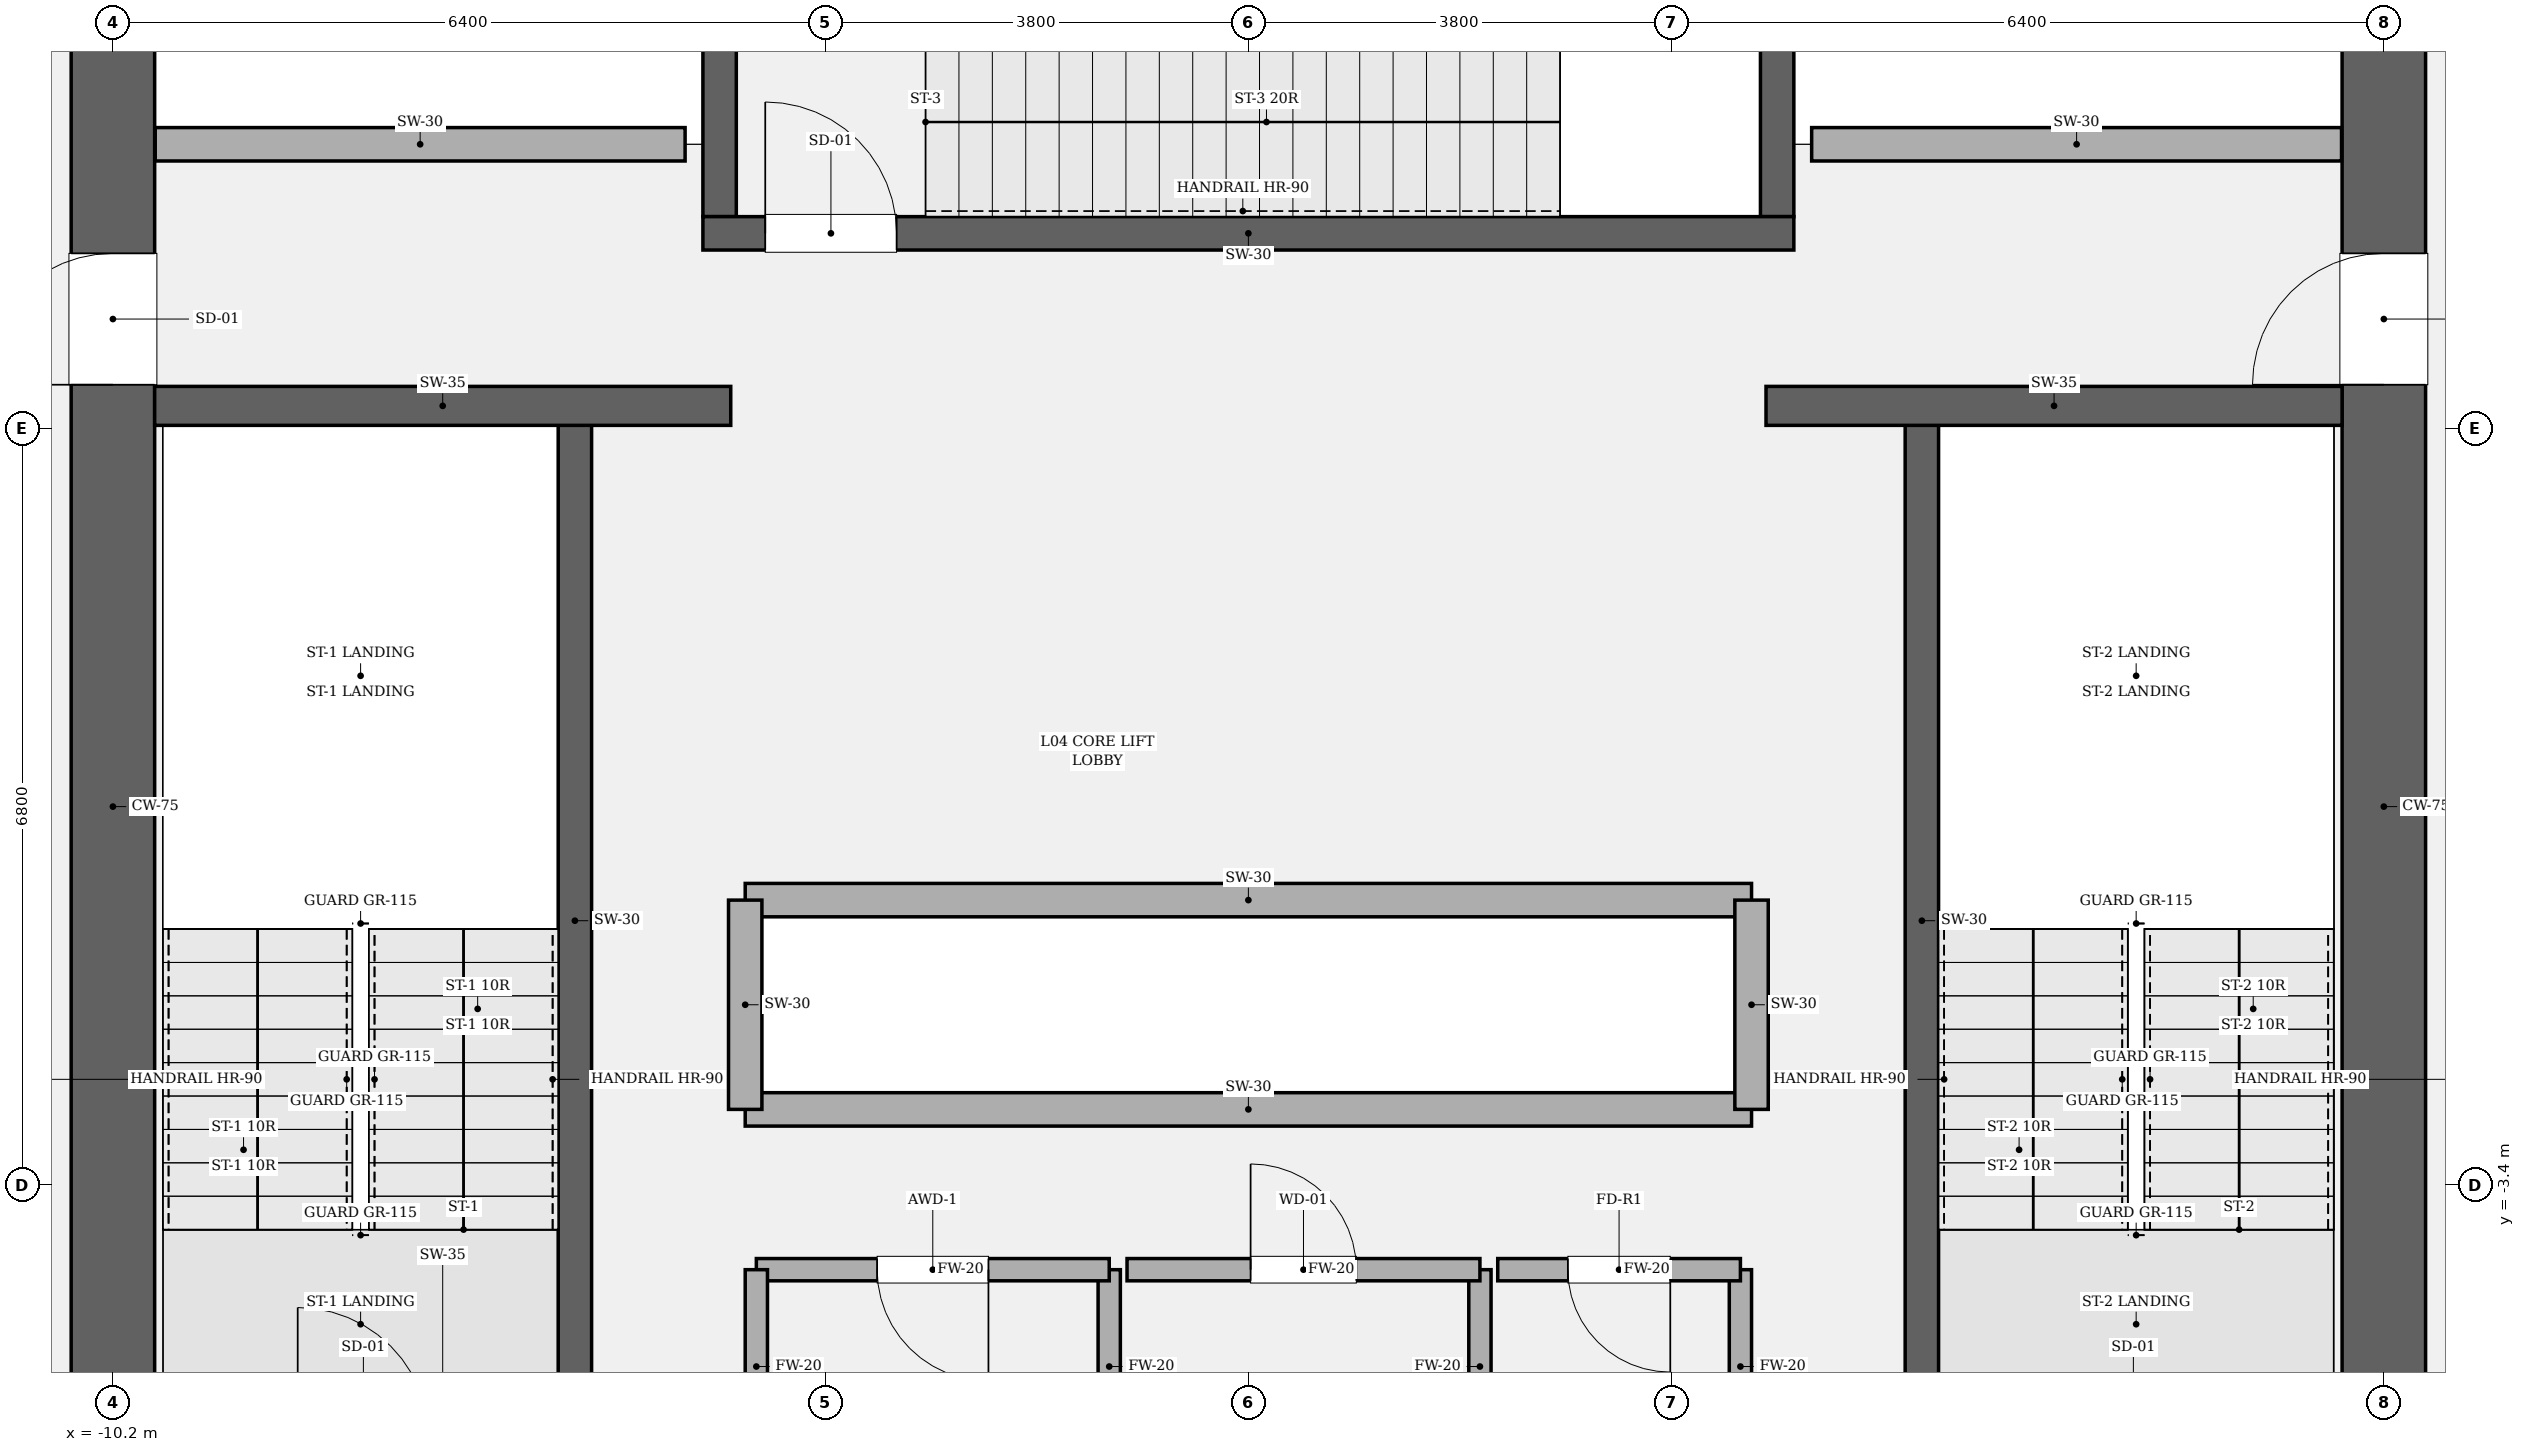
"""IFC4 building model, lengths in metres.
Left out: names, types, materials, properties, quantities, classifications, styles, units other than length and angle.
Written with IfcOpenShell. Run it as: python <this file> out.ifc"""

import sys

from ifc_helpers import new_model, si_unit, direction, frame, frame_2d, origin, place, context, subcontext, project, spatial, rectangle, extrude, element, fill, save


model = new_model("IFC4")
c1 = context("Model", 3, precision=1e-05, world=origin(), true_north=direction((0.0, 1.0)))
c2 = subcontext(c1, "Body", "Model", "MODEL_VIEW")
j1 = project(units=[si_unit("LENGTHUNIT", "METRE"), si_unit("PLANEANGLEUNIT", "RADIAN")], contexts=[c1])
p1 = place(None, origin())
s1 = spatial("IfcSite", under=j1, at=p1, CompositionType="ELEMENT")
p2 = place(p1, origin())
s2 = spatial("IfcBuilding", under=s1, at=p2, CompositionType="ELEMENT")
p3 = place(p2, frame((0.0, 0.0, 22.2)))
s3 = spatial("IfcBuildingStorey", under=s2, at=p3, CompositionType="ELEMENT", Elevation=22.2)
p4 = place(p3, frame((-10.2, -8.825, 0.0), z_axis=(0.0, 0.0, 1.0), x_axis=(0.0, 1.0, 0.0)))
e1 = element("IfcWall", 1, at=p4, inside=s3, PredefinedType="SHEAR", context=c2, shape_type="SweptSolid", body=[
    extrude(rectangle(XDim=17.65, YDim=0.75, at=frame_2d((8.825, 0.0))), origin(), (0.0, 0.0, 1.0), 6.0),
])
p5 = place(p4, frame((12.615, 0.0, 0.0)))
e2 = element("IfcOpeningElement", 2, at=p5, cuts=e1, PredefinedType="OPENING", context=c2, shape_type="SweptSolid", body=[
    extrude(rectangle(XDim=1.18, YDim=2.2, at=frame_2d((0.59, 1.1))), frame((0.0, 0.385, 0.0), z_axis=(0.0, -1.0, 0.0), x_axis=(1.0, 0.0, 0.0)), (0.0, 0.0, 1.0), 0.77),
])
p6 = place(p3, frame((10.2, 8.825, 0.0), z_axis=(0.0, 0.0, 1.0), x_axis=(0.0, -1.0, 0.0)))
e3 = element("IfcWall", 3, at=p6, inside=s3, PredefinedType="SHEAR", context=c2, shape_type="SweptSolid", body=[
    extrude(rectangle(XDim=17.65, YDim=0.75, at=frame_2d((8.825, 0.0))), origin(), (0.0, 0.0, 1.0), 6.0),
])
p7 = place(p6, frame((3.855, 0.0, 0.0)))
e4 = element("IfcOpeningElement", 4, at=p7, cuts=e3, PredefinedType="OPENING", context=c2, shape_type="SweptSolid", body=[
    extrude(rectangle(XDim=1.18, YDim=2.2, at=frame_2d((0.59, 1.1))), frame((0.0, 0.385, 0.0), z_axis=(0.0, -1.0, 0.0), x_axis=(1.0, 0.0, 0.0)), (0.0, 0.0, 1.0), 0.77),
])
for number, where, z_axis, x_axis in (
    (5, (-6.05, -5.5, 0.0), (0.0, 0.0, 1.0), (0.0, 1.0, 0.0)),
    (6, (6.05, 3.45, 0.0), (0.0, 0.0, 1.0), (0.0, -1.0, 0.0)),
):
    element("IfcWall", number, at=place(p3, frame(where, z_axis=z_axis, x_axis=x_axis)), inside=s3, PredefinedType="SOLIDWALL", context=c2, shape_type="SweptSolid", body=[
        extrude(rectangle(XDim=8.95, YDim=0.3, at=frame_2d((4.475, 0.0))), origin(), (0.0, 0.0, 1.0), 6.0),
    ])
for number, where, z_axis, x_axis in (
    (7, (-4.75, 5.3, 0.0), (0.0, 0.0, 1.0), (0.0, 1.0, 0.0)),
    (8, (4.75, 8.825, 0.0), (0.0, 0.0, 1.0), (0.0, -1.0, 0.0)),
):
    element("IfcWall", number, at=place(p3, frame(where, z_axis=z_axis, x_axis=x_axis)), inside=s3, PredefinedType="SOLIDWALL", context=c2, shape_type="SweptSolid", body=[
        extrude(rectangle(XDim=3.525, YDim=0.3, at=frame_2d((1.762, 0.0))), origin(), (0.0, 0.0, 1.0), 6.0),
    ])
p8 = place(p3, frame((-4.9, 5.15, 0.0), z_axis=(0.0, 0.0, 1.0), x_axis=(1.0, 0.0, 0.0)))
e9 = element("IfcWall", 9, at=p8, inside=s3, PredefinedType="SOLIDWALL", context=c2, shape_type="SweptSolid", body=[
    extrude(rectangle(XDim=9.8, YDim=0.3, at=frame_2d((4.9, 0.0))), origin(), (0.0, 0.0, 1.0), 6.0),
])
p9 = place(p8, frame((0.56, 0.0, 0.0)))
e10 = element("IfcOpeningElement", 10, at=p9, cuts=e9, PredefinedType="OPENING", context=c2, shape_type="SweptSolid", body=[
    extrude(rectangle(XDim=1.18, YDim=2.2, at=frame_2d((0.59, 1.1))), frame((0.0, 0.16, 0.0), z_axis=(0.0, -1.0, 0.0), x_axis=(1.0, 0.0, 0.0)), (0.0, 0.0, 1.0), 0.32),
])
for number, where, z_axis, x_axis in (
    (11, (-9.825, 3.6, 0.0), (0.0, 0.0, 1.0), (1.0, 0.0, 0.0)),
    (12, (4.65, 3.6, 0.0), (0.0, 0.0, 1.0), (1.0, 0.0, 0.0)),
):
    element("IfcWall", number, at=place(p3, frame(where, z_axis=z_axis, x_axis=x_axis)), inside=s3, PredefinedType="SOLIDWALL", context=c2, shape_type="SweptSolid", body=[
        extrude(rectangle(XDim=5.175, YDim=0.35, at=frame_2d((2.587, 0.0))), origin(), (0.0, 0.0, 1.0), 6.0),
    ])
for number, where, z_axis, x_axis in (
    (13, (-4.52, -0.84, 0.0), (0.0, 0.0, 1.0), (1.0, 0.0, 0.0)),
    (14, (-4.52, -2.72, 0.0), (0.0, 0.0, 1.0), (1.0, 0.0, 0.0)),
):
    element("IfcWall", number, at=place(p3, frame(where, z_axis=z_axis, x_axis=x_axis)), inside=s3, PredefinedType="SOLIDWALL", context=c2, shape_type="SweptSolid", body=[
        extrude(rectangle(XDim=9.04, YDim=0.3, at=frame_2d((4.52, 0.0))), origin(), (0.0, 0.0, 1.0), 5.72),
    ])
for number, where, z_axis, x_axis in (
    (15, (-4.52, -2.72, 0.0), (0.0, 0.0, 1.0), (0.0, 1.0, 0.0)),
    (16, (4.52, -2.72, 0.0), (0.0, 0.0, 1.0), (0.0, 1.0, 0.0)),
):
    element("IfcWall", number, at=place(p3, frame(where, z_axis=z_axis, x_axis=x_axis)), inside=s3, PredefinedType="SOLIDWALL", context=c2, shape_type="SweptSolid", body=[
        extrude(rectangle(XDim=1.88, YDim=0.3, at=frame_2d((0.94, 0.0))), origin(), (0.0, 0.0, 1.0), 5.72),
    ])
for number, where, z_axis, x_axis in (
    (17, (-9.82, 5.95, 0.0), (0.0, 0.0, 1.0), (1.0, 0.0, 0.0)),
    (18, (5.06, 5.95, 0.0), (0.0, 0.0, 1.0), (1.0, 0.0, 0.0)),
):
    element("IfcWall", number, at=place(p3, frame(where, z_axis=z_axis, x_axis=x_axis)), inside=s3, PredefinedType="SOLIDWALL", context=c2, shape_type="SweptSolid", body=[
        extrude(rectangle(XDim=4.76, YDim=0.3, at=frame_2d((2.38, 0.0))), origin(), (0.0, 0.0, 1.0), 5.72),
    ])
p10 = place(p3, frame((-1.25, -5.9, 0.0), z_axis=(0.0, 0.0, 1.0), x_axis=(0.0, 1.0, 0.0)))
e19 = element("IfcWall", 19, at=p10, inside=s3, PredefinedType="SOLIDWALL", context=c2, shape_type="SweptSolid", body=[
    extrude(rectangle(XDim=1.74, YDim=0.2, at=frame_2d((0.87, 0.0))), origin(), (0.0, 0.0, 1.0), 5.72),
])
p11 = place(p3, frame((-1.25, -4.16, 0.0), z_axis=(0.0, 0.0, 1.0), x_axis=(-1.0, 0.0, 0.0)))
e20 = element("IfcWall", 20, at=p11, inside=s3, PredefinedType="SOLIDWALL", context=c2, shape_type="SweptSolid", body=[
    extrude(rectangle(XDim=3.17, YDim=0.2, at=frame_2d((1.585, 0.0))), origin(), (0.0, 0.0, 1.0), 5.72),
])
p12 = place(p11, frame((1.085, 0.0, 0.0)))
e21 = element("IfcOpeningElement", 21, at=p12, cuts=e20, PredefinedType="OPENING", context=c2, shape_type="SweptSolid", body=[
    extrude(rectangle(XDim=1.0, YDim=2.15, at=frame_2d((0.5, 1.075))), frame((0.0, 0.11, 0.0), z_axis=(0.0, -1.0, 0.0), x_axis=(1.0, 0.0, 0.0)), (0.0, 0.0, 1.0), 0.22),
])
for number, where, z_axis, x_axis in (
    (22, (-4.42, -4.16, 0.0), (0.0, 0.0, 1.0), (0.0, -1.0, 0.0)),
    (23, (2.08, -5.9, 0.0), (0.0, 0.0, 1.0), (0.0, 1.0, 0.0)),
):
    element("IfcWall", number, at=place(p3, frame(where, z_axis=z_axis, x_axis=x_axis)), inside=s3, PredefinedType="SOLIDWALL", context=c2, shape_type="SweptSolid", body=[
        extrude(rectangle(XDim=1.74, YDim=0.2, at=frame_2d((0.87, 0.0))), origin(), (0.0, 0.0, 1.0), 5.72),
    ])
p13 = place(p3, frame((2.08, -4.16, 0.0), z_axis=(0.0, 0.0, 1.0), x_axis=(-1.0, 0.0, 0.0)))
e24 = element("IfcWall", 24, at=p13, inside=s3, PredefinedType="SOLIDWALL", context=c2, shape_type="SweptSolid", body=[
    extrude(rectangle(XDim=3.17, YDim=0.2, at=frame_2d((1.585, 0.0))), origin(), (0.0, 0.0, 1.0), 5.72),
])
p14 = place(p13, frame((1.11, 0.0, 0.0)))
e25 = element("IfcOpeningElement", 25, at=p14, cuts=e24, PredefinedType="OPENING", context=c2, shape_type="SweptSolid", body=[
    extrude(rectangle(XDim=0.95, YDim=2.15, at=frame_2d((0.475, 1.075))), frame((0.0, 0.11, 0.0), z_axis=(0.0, -1.0, 0.0), x_axis=(1.0, 0.0, 0.0)), (0.0, 0.0, 1.0), 0.22),
])
p15 = place(p3, frame((4.42, -5.9, 0.0), z_axis=(0.0, 0.0, 1.0), x_axis=(0.0, 1.0, 0.0)))
e26 = element("IfcWall", 26, at=p15, inside=s3, PredefinedType="SOLIDWALL", context=c2, shape_type="SweptSolid", body=[
    extrude(rectangle(XDim=1.74, YDim=0.2, at=frame_2d((0.87, 0.0))), origin(), (0.0, 0.0, 1.0), 5.72),
])
p16 = place(p3, frame((4.42, -4.16, 0.0), z_axis=(0.0, 0.0, 1.0), x_axis=(-1.0, 0.0, 0.0)))
e27 = element("IfcWall", 27, at=p16, inside=s3, PredefinedType="SOLIDWALL", context=c2, shape_type="SweptSolid", body=[
    extrude(rectangle(XDim=2.18, YDim=0.2, at=frame_2d((1.09, 0.0))), origin(), (0.0, 0.0, 1.0), 5.72),
])
p17 = place(p16, frame((0.63, 0.0, 0.0)))
e28 = element("IfcOpeningElement", 28, at=p17, cuts=e27, PredefinedType="OPENING", context=c2, shape_type="SweptSolid", body=[
    extrude(rectangle(XDim=0.92, YDim=2.1, at=frame_2d((0.46, 1.05))), frame((0.0, 0.11, 0.0), z_axis=(0.0, -1.0, 0.0), x_axis=(1.0, 0.0, 0.0)), (0.0, 0.0, 1.0), 0.22),
])
p18 = place(p9, origin())
e29 = element("IfcDoor", 29, at=p18, inside=s3, OperationType="SINGLE_SWING_LEFT", PredefinedType="DOOR", context=c2, shape_type="SweptSolid", body=[
    extrude(rectangle(XDim=1.18, YDim=2.2, at=frame_2d((0.59, 1.1))), frame((0.0, 0.025, 0.0), z_axis=(0.0, -1.0, 0.0), x_axis=(1.0, 0.0, 0.0)), (0.0, 0.0, 1.0), 0.05),
])
fill(e10, e29)
p19 = place(p5, origin())
e30 = element("IfcDoor", 30, at=p19, inside=s3, OperationType="SINGLE_SWING_LEFT", PredefinedType="DOOR", context=c2, shape_type="SweptSolid", body=[
    extrude(rectangle(XDim=1.18, YDim=2.2, at=frame_2d((0.59, 1.1))), frame((0.0, 0.025, 0.0), z_axis=(0.0, -1.0, 0.0), x_axis=(1.0, 0.0, 0.0)), (0.0, 0.0, 1.0), 0.05),
])
fill(e2, e30)
p20 = place(p7, origin())
e31 = element("IfcDoor", 31, at=p20, inside=s3, OperationType="SINGLE_SWING_RIGHT", PredefinedType="DOOR", context=c2, shape_type="SweptSolid", body=[
    extrude(rectangle(XDim=1.18, YDim=2.2, at=frame_2d((0.59, 1.1))), frame((0.0, 0.025, 0.0), z_axis=(0.0, -1.0, 0.0), x_axis=(1.0, 0.0, 0.0)), (0.0, 0.0, 1.0), 0.05),
])
fill(e4, e31)
p21 = place(p12, origin())
e32 = element("IfcDoor", 32, at=p21, inside=s3, OperationType="SINGLE_SWING_LEFT", PredefinedType="DOOR", context=c2, shape_type="SweptSolid", body=[
    extrude(rectangle(XDim=1.0, YDim=2.15, at=frame_2d((0.5, 1.075))), frame((0.0, 0.025, 0.0), z_axis=(0.0, -1.0, 0.0), x_axis=(1.0, 0.0, 0.0)), (0.0, 0.0, 1.0), 0.05),
])
fill(e21, e32)
p22 = place(p14, origin())
e33 = element("IfcDoor", 33, at=p22, inside=s3, OperationType="SINGLE_SWING_RIGHT", PredefinedType="DOOR", context=c2, shape_type="SweptSolid", body=[
    extrude(rectangle(XDim=0.95, YDim=2.15, at=frame_2d((0.475, 1.075))), frame((0.0, 0.025, 0.0), z_axis=(0.0, -1.0, 0.0), x_axis=(1.0, 0.0, 0.0)), (0.0, 0.0, 1.0), 0.05),
])
fill(e25, e33)
p23 = place(p17, origin())
e34 = element("IfcDoor", 34, at=p23, inside=s3, OperationType="SINGLE_SWING_LEFT", PredefinedType="DOOR", context=c2, shape_type="SweptSolid", body=[
    extrude(rectangle(XDim=0.92, YDim=2.1, at=frame_2d((0.46, 1.05))), frame((0.0, 0.025, 0.0), z_axis=(0.0, -1.0, 0.0), x_axis=(1.0, 0.0, 0.0)), (0.0, 0.0, 1.0), 0.05),
])
fill(e28, e34)
save(model, sys.argv[1])
